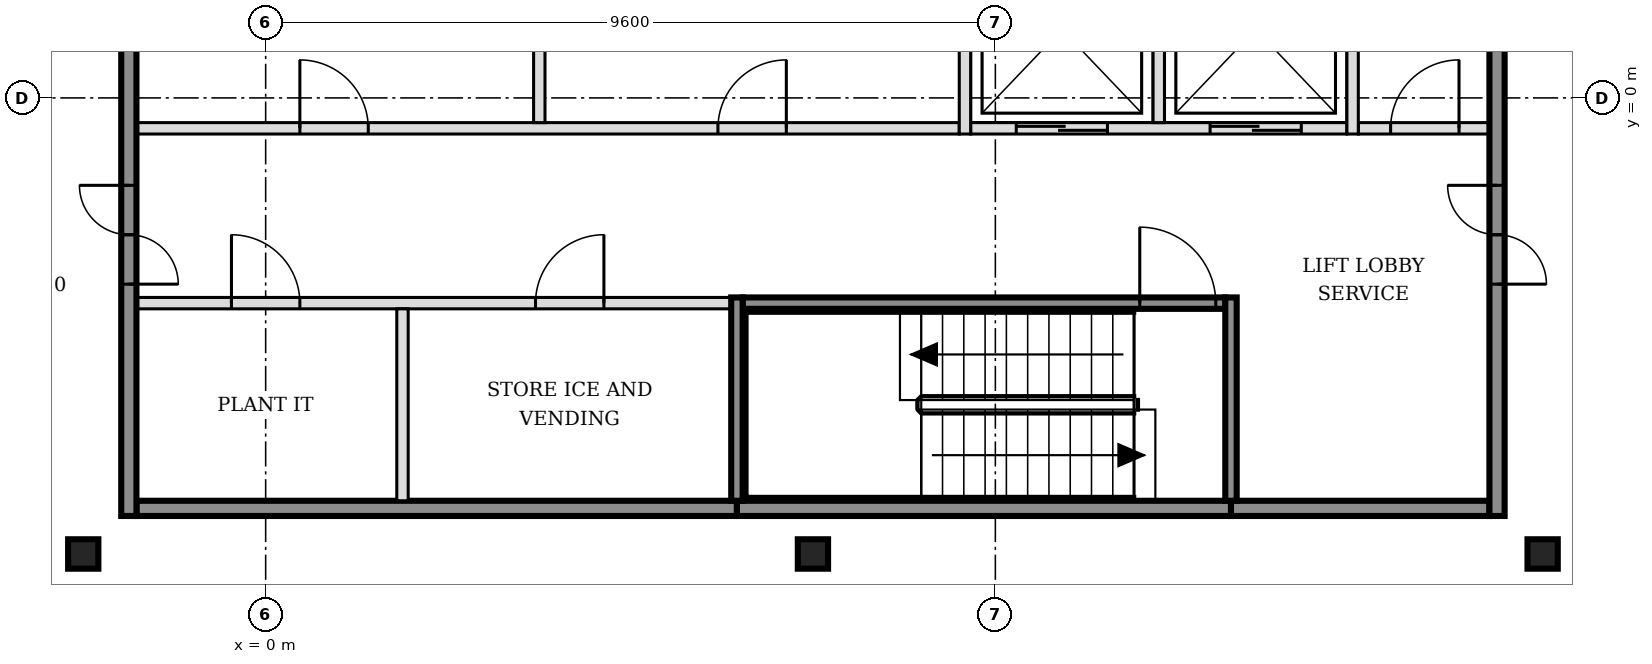
"""IFC4 building model, lengths in metres.
Left out: names, types, materials, properties, quantities, classifications, styles, units other than length and angle.
Written with IfcOpenShell. Run it as: python <this file> out.ifc"""

import sys

from ifc_helpers import new_model, si_unit, direction, frame, frame_2d, origin, origin_2d, place, context, subcontext, project, spatial, rectangle, i_section, extrude, element, fill, save


model = new_model("IFC4")
c1 = context("Model", 3, precision=1e-05, world=origin(), true_north=direction((0.0, 1.0)))
c2 = subcontext(c1, "Body", "Model", "MODEL_VIEW")
j1 = project(units=[si_unit("LENGTHUNIT", "METRE"), si_unit("PLANEANGLEUNIT", "RADIAN")], contexts=[c1])
p1 = place(None, origin())
s1 = spatial("IfcSite", under=j1, at=p1, CompositionType="ELEMENT")
p2 = place(p1, origin())
s2 = spatial("IfcBuilding", under=s1, at=p2, CompositionType="ELEMENT")
p3 = place(p2, frame((0.0, 0.0, 239.4)))
s3 = spatial("IfcBuildingStorey", under=s2, at=p3, CompositionType="ELEMENT", Elevation=239.4)
for number, where, z_axis, x_axis in (
    (1, (-2.4, -6.0, -0.15), (0.0, 0.0, 1.0), (1.0, 0.0, 0.0)),
    (2, (7.2, -6.0, -0.15), (0.0, 0.0, 1.0), (1.0, 0.0, 0.0)),
    (3, (16.8, -6.0, -0.15), (0.0, 0.0, 1.0), (1.0, 0.0, 0.0)),
):
    element("IfcColumn", number, at=place(p3, frame(where, z_axis=z_axis, x_axis=x_axis)), inside=s3, PredefinedType="COLUMN", context=c2, shape_type="SweptSolid", body=[
        extrude(i_section(OverallWidth=0.398, OverallDepth=0.387, WebThickness=0.021, FlangeThickness=0.033, FilletRadius=0.015, at=origin_2d()), origin(), (0.0, 0.0, 1.0), 3.6),
    ])
p4 = place(p3, frame((-1.7, -5.4, 0.0), z_axis=(0.0, 0.0, 1.0), x_axis=(1.0, 0.0, 0.0)))
e4 = element("IfcWall", 4, at=p4, inside=s3, PredefinedType="SOLIDWALL", context=c2, shape_type="SweptSolid", body=[
    extrude(rectangle(XDim=7.9, YDim=0.2, at=frame_2d((3.95, 0.0))), origin(), (0.0, 0.0, 1.0), 3.45),
])
p5 = place(p3, frame((6.2, -5.4, 0.0), z_axis=(0.0, 0.0, 1.0), x_axis=(1.0, 0.0, 0.0)))
e5 = element("IfcWall", 5, at=p5, inside=s3, PredefinedType="SOLIDWALL", context=c2, shape_type="SweptSolid", body=[
    extrude(rectangle(XDim=6.5, YDim=0.2, at=frame_2d((3.25, 0.0))), origin(), (0.0, 0.0, 1.0), 3.45),
])
p6 = place(p3, frame((12.7, -5.4, 0.0), z_axis=(0.0, 0.0, 1.0), x_axis=(1.0, 0.0, 0.0)))
e6 = element("IfcWall", 6, at=p6, inside=s3, PredefinedType="SOLIDWALL", context=c2, shape_type="SweptSolid", body=[
    extrude(rectangle(XDim=3.4, YDim=0.2, at=frame_2d((1.7, 0.0))), origin(), (0.0, 0.0, 1.0), 3.45),
])
p7 = place(p3, frame((-1.7, -2.7, 0.0), z_axis=(0.0, 0.0, 1.0), x_axis=(1.0, 0.0, 0.0)))
e7 = element("IfcWall", 7, at=p7, inside=s3, PredefinedType="PARTITIONING", context=c2, shape_type="SweptSolid", body=[
    extrude(rectangle(XDim=7.825, YDim=0.15, at=frame_2d((3.913, 0.0))), origin(), (0.0, 0.0, 1.0), 3.45),
])
p8 = place(p7, frame((1.25, 0.0, 0.0)))
e8 = element("IfcOpeningElement", 8, at=p8, cuts=e7, PredefinedType="OPENING", context=c2, shape_type="SweptSolid", body=[
    extrude(rectangle(XDim=0.9, YDim=2.1, at=frame_2d((0.45, 1.05))), frame((0.0, 0.085, 0.0), z_axis=(0.0, -1.0, 0.0), x_axis=(1.0, 0.0, 0.0)), (0.0, 0.0, 1.0), 0.17),
])
p9 = place(p7, frame((5.25, 0.0, 0.0)))
e9 = element("IfcOpeningElement", 9, at=p9, cuts=e7, PredefinedType="OPENING", context=c2, shape_type="SweptSolid", body=[
    extrude(rectangle(XDim=0.9, YDim=2.1, at=frame_2d((0.45, 1.05))), frame((0.0, 0.085, 0.0), z_axis=(0.0, -1.0, 0.0), x_axis=(1.0, 0.0, 0.0)), (0.0, 0.0, 1.0), 0.17),
])
p10 = place(p3, frame((6.275, -2.7, 0.0), z_axis=(0.0, 0.0, 1.0), x_axis=(1.0, 0.0, 0.0)))
e10 = element("IfcWall", 10, at=p10, inside=s3, PredefinedType="SOLIDWALL", context=c2, shape_type="SweptSolid", body=[
    extrude(rectangle(XDim=6.35, YDim=0.15, at=frame_2d((3.175, 0.0))), origin(), (0.0, 0.0, 1.0), 3.45),
])
p11 = place(p10, frame((5.225, 0.0, 0.0)))
e11 = element("IfcOpeningElement", 11, at=p11, cuts=e10, PredefinedType="OPENING", context=c2, shape_type="SweptSolid", body=[
    extrude(rectangle(XDim=1.0, YDim=2.1, at=frame_2d((0.5, 1.05))), frame((0.0, 0.085, 0.0), z_axis=(0.0, -1.0, 0.0), x_axis=(1.0, 0.0, 0.0)), (0.0, 0.0, 1.0), 0.17),
])
p12 = place(p3, frame((-1.7, -0.4, 0.0), z_axis=(0.0, 0.0, 1.0), x_axis=(1.0, 0.0, 0.0)))
e12 = element("IfcWall", 12, at=p12, inside=s3, PredefinedType="PARTITIONING", context=c2, shape_type="SweptSolid", body=[
    extrude(rectangle(XDim=10.825, YDim=0.15, at=frame_2d((5.413, 0.0))), origin(), (0.0, 0.0, 1.0), 3.45),
])
p13 = place(p12, frame((2.15, 0.0, 0.0)))
e13 = element("IfcOpeningElement", 13, at=p13, cuts=e12, PredefinedType="OPENING", context=c2, shape_type="SweptSolid", body=[
    extrude(rectangle(XDim=0.9, YDim=2.1, at=frame_2d((0.45, 1.05))), frame((0.0, 0.085, 0.0), z_axis=(0.0, -1.0, 0.0), x_axis=(1.0, 0.0, 0.0)), (0.0, 0.0, 1.0), 0.17),
])
p14 = place(p12, frame((7.65, 0.0, 0.0)))
e14 = element("IfcOpeningElement", 14, at=p14, cuts=e12, PredefinedType="OPENING", context=c2, shape_type="SweptSolid", body=[
    extrude(rectangle(XDim=0.9, YDim=2.1, at=frame_2d((0.45, 1.05))), frame((0.0, 0.085, 0.0), z_axis=(0.0, -1.0, 0.0), x_axis=(1.0, 0.0, 0.0)), (0.0, 0.0, 1.0), 0.17),
])
p15 = place(p3, frame((9.275, -0.4, 0.0), z_axis=(0.0, 0.0, 1.0), x_axis=(1.0, 0.0, 0.0)))
e15 = element("IfcWall", 15, at=p15, inside=s3, PredefinedType="SOLIDWALL", context=c2, shape_type="SweptSolid", body=[
    extrude(rectangle(XDim=4.95, YDim=0.15, at=frame_2d((2.475, 0.0))), origin(), (0.0, 0.0, 1.0), 3.45),
])
p16 = place(p15, frame((0.6, 0.0, 0.0)))
e16 = element("IfcOpeningElement", 16, at=p16, cuts=e15, PredefinedType="OPENING", context=c2, shape_type="SweptSolid", body=[
    extrude(rectangle(XDim=1.2, YDim=2.1, at=frame_2d((0.6, 1.05))), frame((0.0, 0.085, 0.0), z_axis=(0.0, -1.0, 0.0), x_axis=(1.0, 0.0, 0.0)), (0.0, 0.0, 1.0), 0.17),
])
p17 = place(p15, frame((3.15, 0.0, 0.0)))
e17 = element("IfcOpeningElement", 17, at=p17, cuts=e15, PredefinedType="OPENING", context=c2, shape_type="SweptSolid", body=[
    extrude(rectangle(XDim=1.2, YDim=2.1, at=frame_2d((0.6, 1.05))), frame((0.0, 0.085, 0.0), z_axis=(0.0, -1.0, 0.0), x_axis=(1.0, 0.0, 0.0)), (0.0, 0.0, 1.0), 0.17),
])
p18 = place(p3, frame((14.375, -0.4, 0.0), z_axis=(0.0, 0.0, 1.0), x_axis=(1.0, 0.0, 0.0)))
e18 = element("IfcWall", 18, at=p18, inside=s3, PredefinedType="PARTITIONING", context=c2, shape_type="SweptSolid", body=[
    extrude(rectangle(XDim=1.725, YDim=0.15, at=frame_2d((0.863, 0.0))), origin(), (0.0, 0.0, 1.0), 3.45),
])
p19 = place(p18, frame((0.425, 0.0, 0.0)))
e19 = element("IfcOpeningElement", 19, at=p19, cuts=e18, PredefinedType="OPENING", context=c2, shape_type="SweptSolid", body=[
    extrude(rectangle(XDim=0.9, YDim=2.1, at=frame_2d((0.45, 1.05))), frame((0.0, 0.085, 0.0), z_axis=(0.0, -1.0, 0.0), x_axis=(1.0, 0.0, 0.0)), (0.0, 0.0, 1.0), 0.17),
])
p20 = place(p3, frame((-1.8, -5.5, 0.0), z_axis=(0.0, 0.0, 1.0), x_axis=(0.0, 1.0, 0.0)))
e20 = element("IfcWall", 20, at=p20, inside=s3, PredefinedType="SOLIDWALL", context=c2, shape_type="SweptSolid", body=[
    extrude(rectangle(XDim=15.8, YDim=0.2, at=frame_2d((7.9, 0.0))), origin(), (0.0, 0.0, 1.0), 3.45),
])
p21 = place(p20, frame((3.05, 0.0, 0.0)))
e21 = element("IfcOpeningElement", 21, at=p21, cuts=e20, PredefinedType="OPENING", context=c2, shape_type="SweptSolid", body=[
    extrude(rectangle(XDim=1.3, YDim=2.1, at=frame_2d((0.65, 1.05))), frame((0.0, 0.11, 0.0), z_axis=(0.0, -1.0, 0.0), x_axis=(1.0, 0.0, 0.0)), (0.0, 0.0, 1.0), 0.22),
])
p22 = place(p20, frame((11.45, 0.0, 0.0)))
e22 = element("IfcOpeningElement", 22, at=p22, cuts=e20, PredefinedType="OPENING", context=c2, shape_type="SweptSolid", body=[
    extrude(rectangle(XDim=1.3, YDim=2.1, at=frame_2d((0.65, 1.05))), frame((0.0, 0.11, 0.0), z_axis=(0.0, -1.0, 0.0), x_axis=(1.0, 0.0, 0.0)), (0.0, 0.0, 1.0), 0.22),
])
p23 = place(p3, frame((1.8, -5.3, 0.0), z_axis=(0.0, 0.0, 1.0), x_axis=(0.0, 1.0, 0.0)))
e23 = element("IfcWall", 23, at=p23, inside=s3, PredefinedType="PARTITIONING", context=c2, shape_type="SweptSolid", body=[
    extrude(rectangle(XDim=2.525, YDim=0.15, at=frame_2d((1.263, 0.0))), origin(), (0.0, 0.0, 1.0), 3.45),
])
p24 = place(p3, frame((3.6, -0.325, 0.0), z_axis=(0.0, 0.0, 1.0), x_axis=(0.0, 1.0, 0.0)))
e24 = element("IfcWall", 24, at=p24, inside=s3, PredefinedType="PARTITIONING", context=c2, shape_type="SweptSolid", body=[
    extrude(rectangle(XDim=2.45, YDim=0.15, at=frame_2d((1.225, 0.0))), origin(), (0.0, 0.0, 1.0), 3.45),
])
p25 = place(p3, frame((6.2, -5.3, 0.0), z_axis=(0.0, 0.0, 1.0), x_axis=(0.0, 1.0, 0.0)))
e25 = element("IfcWall", 25, at=p25, inside=s3, PredefinedType="SOLIDWALL", context=c2, shape_type="SweptSolid", body=[
    extrude(rectangle(XDim=2.675, YDim=0.15, at=frame_2d((1.337, 0.0))), origin(), (0.0, 0.0, 1.0), 3.45),
])
p26 = place(p3, frame((9.2, -0.475, 0.0), z_axis=(0.0, 0.0, 1.0), x_axis=(0.0, 1.0, 0.0)))
e26 = element("IfcWall", 26, at=p26, inside=s3, PredefinedType="SOLIDWALL", context=c2, shape_type="SweptSolid", body=[
    extrude(rectangle(XDim=2.6, YDim=0.15, at=frame_2d((1.3, 0.0))), origin(), (0.0, 0.0, 1.0), 3.45),
])
p27 = place(p3, frame((11.75, -0.325, 0.0), z_axis=(0.0, 0.0, 1.0), x_axis=(0.0, 1.0, 0.0)))
e27 = element("IfcWall", 27, at=p27, inside=s3, PredefinedType="SOLIDWALL", context=c2, shape_type="SweptSolid", body=[
    extrude(rectangle(XDim=2.45, YDim=0.15, at=frame_2d((1.225, 0.0))), origin(), (0.0, 0.0, 1.0), 3.45),
])
p28 = place(p3, frame((12.7, -5.3, 0.0), z_axis=(0.0, 0.0, 1.0), x_axis=(0.0, 1.0, 0.0)))
e28 = element("IfcWall", 28, at=p28, inside=s3, PredefinedType="SOLIDWALL", context=c2, shape_type="SweptSolid", body=[
    extrude(rectangle(XDim=2.675, YDim=0.15, at=frame_2d((1.337, 0.0))), origin(), (0.0, 0.0, 1.0), 3.45),
])
p29 = place(p3, frame((14.3, -0.475, 0.0), z_axis=(0.0, 0.0, 1.0), x_axis=(0.0, 1.0, 0.0)))
e29 = element("IfcWall", 29, at=p29, inside=s3, PredefinedType="SOLIDWALL", context=c2, shape_type="SweptSolid", body=[
    extrude(rectangle(XDim=2.75, YDim=0.15, at=frame_2d((1.375, 0.0))), origin(), (0.0, 0.0, 1.0), 3.45),
])
p30 = place(p3, frame((16.2, -5.5, 0.0), z_axis=(0.0, 0.0, 1.0), x_axis=(0.0, 1.0, 0.0)))
e30 = element("IfcWall", 30, at=p30, inside=s3, PredefinedType="SOLIDWALL", context=c2, shape_type="SweptSolid", body=[
    extrude(rectangle(XDim=15.8, YDim=0.2, at=frame_2d((7.9, 0.0))), origin(), (0.0, 0.0, 1.0), 3.45),
])
p31 = place(p30, frame((3.05, 0.0, 0.0)))
e31 = element("IfcOpeningElement", 31, at=p31, cuts=e30, PredefinedType="OPENING", context=c2, shape_type="SweptSolid", body=[
    extrude(rectangle(XDim=1.3, YDim=2.1, at=frame_2d((0.65, 1.05))), frame((0.0, 0.11, 0.0), z_axis=(0.0, -1.0, 0.0), x_axis=(1.0, 0.0, 0.0)), (0.0, 0.0, 1.0), 0.22),
])
p32 = place(p30, frame((11.45, 0.0, 0.0)))
e32 = element("IfcOpeningElement", 32, at=p32, cuts=e30, PredefinedType="OPENING", context=c2, shape_type="SweptSolid", body=[
    extrude(rectangle(XDim=1.3, YDim=2.1, at=frame_2d((0.65, 1.05))), frame((0.0, 0.11, 0.0), z_axis=(0.0, -1.0, 0.0), x_axis=(1.0, 0.0, 0.0)), (0.0, 0.0, 1.0), 0.22),
])
p33 = place(p16, origin())
e33 = element("IfcDoor", 33, at=p33, inside=s3, OperationType="DOUBLE_DOOR_SLIDING", PredefinedType="DOOR", context=c2, shape_type="SweptSolid", body=[
    extrude(rectangle(XDim=1.2, YDim=2.1, at=frame_2d((0.6, 1.05))), frame((0.0, 0.025, 0.0), z_axis=(0.0, -1.0, 0.0), x_axis=(1.0, 0.0, 0.0)), (0.0, 0.0, 1.0), 0.05),
])
fill(e16, e33)
p34 = place(p17, origin())
e34 = element("IfcDoor", 34, at=p34, inside=s3, OperationType="DOUBLE_DOOR_SLIDING", PredefinedType="DOOR", context=c2, shape_type="SweptSolid", body=[
    extrude(rectangle(XDim=1.2, YDim=2.1, at=frame_2d((0.6, 1.05))), frame((0.0, 0.025, 0.0), z_axis=(0.0, -1.0, 0.0), x_axis=(1.0, 0.0, 0.0)), (0.0, 0.0, 1.0), 0.05),
])
fill(e17, e34)
p35 = place(p11, origin())
e35 = element("IfcDoor", 35, at=p35, inside=s3, OperationType="SINGLE_SWING_LEFT", PredefinedType="DOOR", context=c2, shape_type="SweptSolid", body=[
    extrude(rectangle(XDim=1.0, YDim=2.1, at=frame_2d((0.5, 1.05))), frame((0.0, 0.025, 0.0), z_axis=(0.0, -1.0, 0.0), x_axis=(1.0, 0.0, 0.0)), (0.0, 0.0, 1.0), 0.05),
])
fill(e11, e35)
p36 = place(p21, origin())
e36 = element("IfcDoor", 36, at=p36, inside=s3, OperationType="DOUBLE_DOOR_SINGLE_SWING", PredefinedType="DOOR", context=c2, shape_type="SweptSolid", body=[
    extrude(rectangle(XDim=1.3, YDim=2.1, at=frame_2d((0.65, 1.05))), frame((0.0, 0.025, 0.0), z_axis=(0.0, -1.0, 0.0), x_axis=(1.0, 0.0, 0.0)), (0.0, 0.0, 1.0), 0.05),
])
fill(e21, e36)
p37 = place(p31, origin())
e37 = element("IfcDoor", 37, at=p37, inside=s3, OperationType="DOUBLE_DOOR_SINGLE_SWING", PredefinedType="DOOR", context=c2, shape_type="SweptSolid", body=[
    extrude(rectangle(XDim=1.3, YDim=2.1, at=frame_2d((0.65, 1.05))), frame((0.0, 0.025, 0.0), z_axis=(0.0, -1.0, 0.0), x_axis=(1.0, 0.0, 0.0)), (0.0, 0.0, 1.0), 0.05),
])
fill(e31, e37)
p38 = place(p19, origin())
e38 = element("IfcDoor", 38, at=p38, inside=s3, OperationType="SINGLE_SWING_RIGHT", PredefinedType="DOOR", context=c2, shape_type="SweptSolid", body=[
    extrude(rectangle(XDim=0.9, YDim=2.1, at=frame_2d((0.45, 1.05))), frame((0.0, 0.025, 0.0), z_axis=(0.0, -1.0, 0.0), x_axis=(1.0, 0.0, 0.0)), (0.0, 0.0, 1.0), 0.05),
])
fill(e19, e38)
p39 = place(p8, origin())
e39 = element("IfcDoor", 39, at=p39, inside=s3, OperationType="SINGLE_SWING_LEFT", PredefinedType="DOOR", context=c2, shape_type="SweptSolid", body=[
    extrude(rectangle(XDim=0.9, YDim=2.1, at=frame_2d((0.45, 1.05))), frame((0.0, 0.025, 0.0), z_axis=(0.0, -1.0, 0.0), x_axis=(1.0, 0.0, 0.0)), (0.0, 0.0, 1.0), 0.05),
])
fill(e8, e39)
p40 = place(p9, origin())
e40 = element("IfcDoor", 40, at=p40, inside=s3, OperationType="SINGLE_SWING_RIGHT", PredefinedType="DOOR", context=c2, shape_type="SweptSolid", body=[
    extrude(rectangle(XDim=0.9, YDim=2.1, at=frame_2d((0.45, 1.05))), frame((0.0, 0.025, 0.0), z_axis=(0.0, -1.0, 0.0), x_axis=(1.0, 0.0, 0.0)), (0.0, 0.0, 1.0), 0.05),
])
fill(e9, e40)
p41 = place(p13, origin())
e41 = element("IfcDoor", 41, at=p41, inside=s3, OperationType="SINGLE_SWING_LEFT", PredefinedType="DOOR", context=c2, shape_type="SweptSolid", body=[
    extrude(rectangle(XDim=0.9, YDim=2.1, at=frame_2d((0.45, 1.05))), frame((0.0, 0.025, 0.0), z_axis=(0.0, -1.0, 0.0), x_axis=(1.0, 0.0, 0.0)), (0.0, 0.0, 1.0), 0.05),
])
fill(e13, e41)
p42 = place(p14, origin())
e42 = element("IfcDoor", 42, at=p42, inside=s3, OperationType="SINGLE_SWING_RIGHT", PredefinedType="DOOR", context=c2, shape_type="SweptSolid", body=[
    extrude(rectangle(XDim=0.9, YDim=2.1, at=frame_2d((0.45, 1.05))), frame((0.0, 0.025, 0.0), z_axis=(0.0, -1.0, 0.0), x_axis=(1.0, 0.0, 0.0)), (0.0, 0.0, 1.0), 0.05),
])
fill(e14, e42)
save(model, sys.argv[1])
